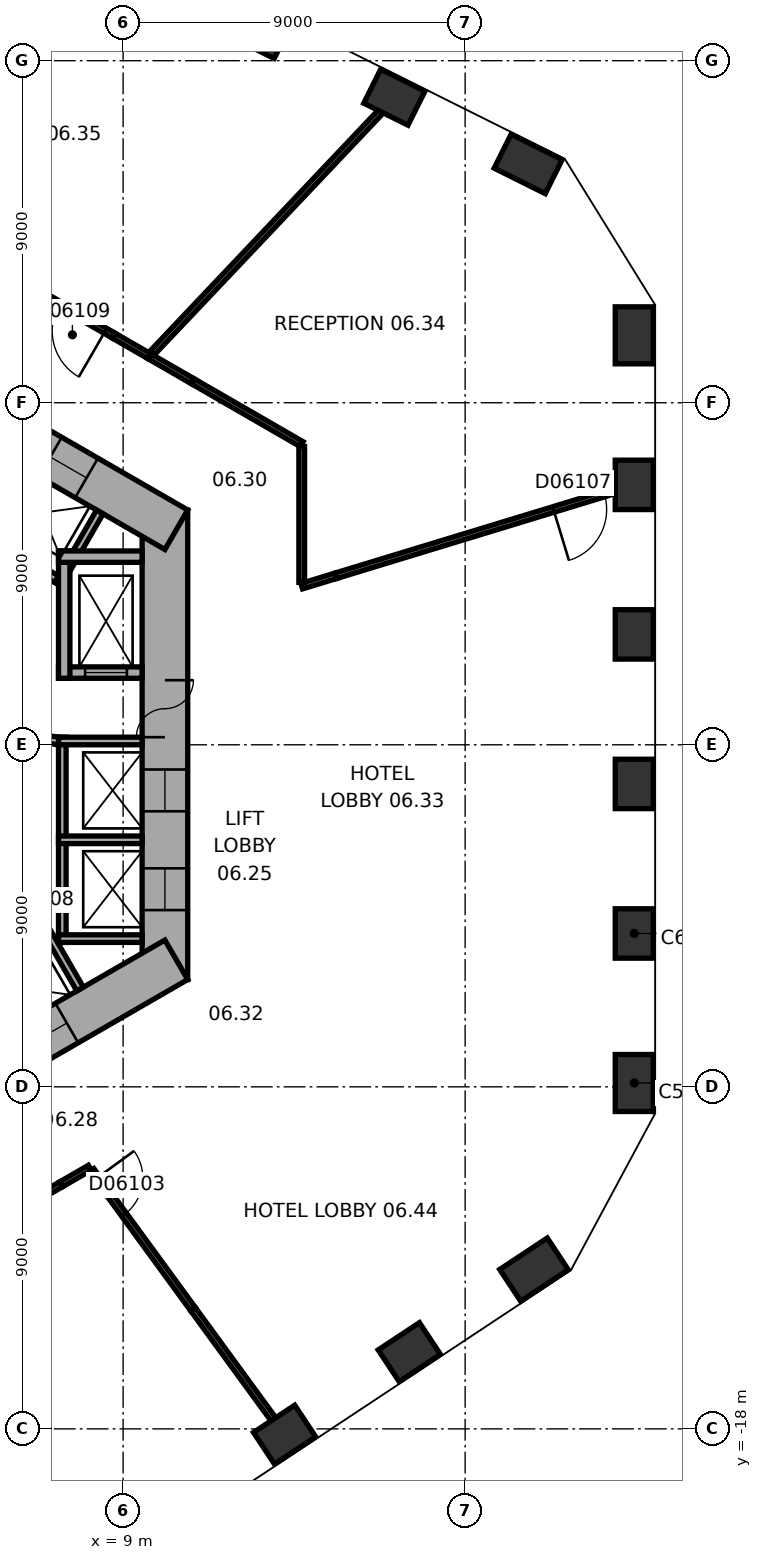
"""IFC4 building model, lengths in metres.
Left out: names, types, materials, properties, quantities, classifications, styles, units other than length and angle.
Written with IfcOpenShell. Run it as: python <this file> out.ifc"""

import sys

from ifc_helpers import new_model, si_unit, direction, frame, frame_2d, origin, origin_2d, place, context, subcontext, project, spatial, rectangle, extrude, element, fill, save


model = new_model("IFC4")
c1 = context("Model", 3, precision=1e-05, world=origin(), true_north=direction((0.0, 1.0)))
c2 = subcontext(c1, "Body", "Model", "MODEL_VIEW")
j1 = project(units=[si_unit("LENGTHUNIT", "METRE"), si_unit("PLANEANGLEUNIT", "RADIAN")], contexts=[c1])
p1 = place(None, origin())
s1 = spatial("IfcSite", under=j1, at=p1, CompositionType="ELEMENT")
p2 = place(p1, origin())
s2 = spatial("IfcBuilding", under=s1, at=p2, CompositionType="ELEMENT")
p3 = place(p2, frame((0.0, 0.0, 39.0)))
s3 = spatial("IfcBuildingStorey", under=s2, at=p3, CompositionType="ELEMENT", Elevation=39.0)
p4 = place(p3, frame((22.45, -8.899, 0.0), z_axis=(0.0, 0.0, 1.0), x_axis=(0.0, 1.0, 0.0)))
e1 = element("IfcColumn", 1, at=p4, inside=s3, PredefinedType="COLUMN", context=c2, shape_type="SweptSolid", body=[
    extrude(rectangle(XDim=1.5, YDim=1.0, at=origin_2d()), origin(), (0.0, 0.0, 1.0), 5.0),
])
for number, where, z_axis, x_axis in (
    (2, (22.45, -4.965, 0.0), (0.0, 0.0, 1.0), (0.0, 1.0, 0.0)),
    (3, (22.45, -1.03, 0.0), (0.0, 0.0, 1.0), (0.0, 1.0, 0.0)),
    (4, (22.45, 2.905, 0.0), (0.0, 0.0, 1.0), (0.0, 1.0, 0.0)),
    (5, (22.45, 6.839, 0.0), (0.0, 0.0, 1.0), (0.0, 1.0, 0.0)),
):
    element("IfcColumn", number, at=place(p3, frame(where, z_axis=z_axis, x_axis=x_axis)), inside=s3, PredefinedType="COLUMN", context=c2, shape_type="SweptSolid", body=[
        extrude(rectangle(XDim=1.3, YDim=1.0, at=origin_2d()), origin(), (0.0, 0.0, 1.0), 5.0),
    ])
for number, where, z_axis, x_axis in (
    (6, (22.45, 10.774, 0.0), (0.0, 0.0, 1.0), (0.0, 1.0, 0.0)),
    (7, (19.659, 15.284, 0.0), (0.0, 0.0, 1.0), (-0.895, 0.446, 0.0)),
):
    element("IfcColumn", number, at=place(p3, frame(where, z_axis=z_axis, x_axis=x_axis)), inside=s3, PredefinedType="COLUMN", context=c2, shape_type="SweptSolid", body=[
        extrude(rectangle(XDim=1.5, YDim=1.0, at=origin_2d()), origin(), (0.0, 0.0, 1.0), 5.0),
    ])
for number, where, z_axis, x_axis in (
    (8, (16.138, 17.04, 0.0), (0.0, 0.0, 1.0), (-0.895, 0.446, 0.0)),
    (9, (12.616, 18.795, 0.0), (0.0, 0.0, 1.0), (-0.895, 0.446, 0.0)),
    (10, (13.25, -18.152, 0.0), (0.0, 0.0, 1.0), (0.834, 0.552, 0.0)),
    (11, (16.531, -15.981, 0.0), (0.0, 0.0, 1.0), (0.834, 0.552, 0.0)),
):
    element("IfcColumn", number, at=place(p3, frame(where, z_axis=z_axis, x_axis=x_axis)), inside=s3, PredefinedType="COLUMN", context=c2, shape_type="SweptSolid", body=[
        extrude(rectangle(XDim=1.3, YDim=1.0, at=origin_2d()), origin(), (0.0, 0.0, 1.0), 5.0),
    ])
p5 = place(p3, frame((19.812, -13.809, 0.0), z_axis=(0.0, 0.0, 1.0), x_axis=(0.833885822067, 0.551936985312, 0.0)))
e12 = element("IfcColumn", 12, at=p5, inside=s3, PredefinedType="COLUMN", context=c2, shape_type="SweptSolid", body=[
    extrude(rectangle(XDim=1.5, YDim=1.0, at=origin_2d()), origin(), (0.0, 0.0, 1.0), 5.0),
])
p6 = place(p3, frame((10.1, -6.177, 0.0), z_axis=(0.0, 0.0, 1.0), x_axis=(0.0, 1.0, 0.0)))
e13 = element("IfcWall", 13, at=p6, inside=s3, PredefinedType="SHEAR", context=c2, shape_type="SweptSolid", body=[
    extrude(rectangle(XDim=12.355, YDim=1.2, at=frame_2d((6.177, 0.0))), origin(), (0.0, 0.0, 1.0), 5.0),
])
p7 = place(p6, frame((6.378, 0.0, 0.0)))
e14 = element("IfcOpeningElement", 14, at=p7, cuts=e13, PredefinedType="OPENING", context=c2, shape_type="SweptSolid", body=[
    extrude(rectangle(XDim=1.5, YDim=2.1, at=frame_2d((0.75, 1.05))), frame((0.0, 0.61, 0.0), z_axis=(0.0, -1.0, 0.0), x_axis=(1.0, 0.0, 0.0)), (0.0, 0.0, 1.0), 1.22),
])
p8 = place(p6, frame((1.828, 0.0, 0.0)))
e15 = element("IfcOpeningElement", 15, at=p8, cuts=e13, PredefinedType="OPENING", context=c2, shape_type="SweptSolid", body=[
    extrude(rectangle(XDim=1.1, YDim=2.1, at=frame_2d((0.55, 1.05))), frame((0.0, 0.61, 0.0), z_axis=(0.0, -1.0, 0.0), x_axis=(1.0, 0.0, 0.0)), (0.0, 0.0, 1.0), 1.22),
])
p9 = place(p6, frame((4.427, 0.0, 0.0)))
e16 = element("IfcOpeningElement", 16, at=p9, cuts=e13, PredefinedType="OPENING", context=c2, shape_type="SweptSolid", body=[
    extrude(rectangle(XDim=1.1, YDim=2.1, at=frame_2d((0.55, 1.05))), frame((0.0, 0.61, 0.0), z_axis=(0.0, -1.0, 0.0), x_axis=(1.0, 0.0, 0.0)), (0.0, 0.0, 1.0), 1.22),
])
p10 = place(p3, frame((10.4, 5.658, 0.0), z_axis=(0.0, 0.0, 1.0), x_axis=(-0.866021384402, 0.500006961711, 0.0)))
e17 = element("IfcWall", 17, at=p10, inside=s3, PredefinedType="SHEAR", context=c2, shape_type="SweptSolid", body=[
    extrude(rectangle(XDim=12.355, YDim=1.2, at=frame_2d((6.178, 0.0))), origin(), (0.0, 0.0, 1.0), 5.0),
])
p11 = place(p10, frame((2.728, 0.0, 0.0)))
e18 = element("IfcOpeningElement", 18, at=p11, cuts=e17, PredefinedType="OPENING", context=c2, shape_type="SweptSolid", body=[
    extrude(rectangle(XDim=1.1, YDim=2.1, at=frame_2d((0.55, 1.05))), frame((0.0, 0.61, 0.0), z_axis=(0.0, -1.0, 0.0), x_axis=(1.0, 0.0, 0.0)), (0.0, 0.0, 1.0), 1.22),
])
p12 = place(p10, frame((5.328, 0.0, 0.0)))
e19 = element("IfcOpeningElement", 19, at=p12, cuts=e17, PredefinedType="OPENING", context=c2, shape_type="SweptSolid", body=[
    extrude(rectangle(XDim=1.1, YDim=2.1, at=frame_2d((0.55, 1.05))), frame((0.0, 0.61, 0.0), z_axis=(0.0, -1.0, 0.0), x_axis=(1.0, 0.0, 0.0)), (0.0, 0.0, 1.0), 1.22),
])
p13 = place(p10, frame((7.928, 0.0, 0.0)))
e20 = element("IfcOpeningElement", 20, at=p13, cuts=e17, PredefinedType="OPENING", context=c2, shape_type="SweptSolid", body=[
    extrude(rectangle(XDim=1.1, YDim=2.1, at=frame_2d((0.55, 1.05))), frame((0.0, 0.61, 0.0), z_axis=(0.0, -1.0, 0.0), x_axis=(1.0, 0.0, 0.0)), (0.0, 0.0, 1.0), 1.22),
])
p14 = place(p3, frame((-0.3, -11.836, 0.0), z_axis=(0.0, 0.0, 1.0), x_axis=(0.866021384402, 0.500006961711, 0.0)))
e21 = element("IfcWall", 21, at=p14, inside=s3, PredefinedType="SHEAR", context=c2, shape_type="SweptSolid", body=[
    extrude(rectangle(XDim=12.355, YDim=1.2, at=frame_2d((6.178, 0.0))), origin(), (0.0, 0.0, 1.0), 5.0),
])
p15 = place(p14, frame((4.128, 0.0, 0.0)))
e22 = element("IfcOpeningElement", 22, at=p15, cuts=e21, PredefinedType="OPENING", context=c2, shape_type="SweptSolid", body=[
    extrude(rectangle(XDim=0.9, YDim=2.1, at=frame_2d((0.45, 1.05))), frame((0.0, 0.61, 0.0), z_axis=(0.0, -1.0, 0.0), x_axis=(1.0, 0.0, 0.0)), (0.0, 0.0, 1.0), 1.22),
])
p16 = place(p14, frame((7.928, 0.0, 0.0)))
e23 = element("IfcOpeningElement", 23, at=p16, cuts=e21, PredefinedType="OPENING", context=c2, shape_type="SweptSolid", body=[
    extrude(rectangle(XDim=1.1, YDim=2.1, at=frame_2d((0.55, 1.05))), frame((0.0, 0.61, 0.0), z_axis=(0.0, -1.0, 0.0), x_axis=(1.0, 0.0, 0.0)), (0.0, 0.0, 1.0), 1.22),
])
p17 = place(p3, frame((7.4, -5.2, 0.0), z_axis=(0.0, 0.0, 1.0), x_axis=(0.0, 1.0, 0.0)))
e24 = element("IfcWall", 24, at=p17, inside=s3, PredefinedType="PARTITIONING", context=c2, shape_type="SweptSolid", body=[
    extrude(rectangle(XDim=5.4, YDim=0.2, at=frame_2d((2.7, 0.0))), origin(), (0.0, 0.0, 1.0), 4.75),
])
for number, where, z_axis, x_axis in (
    (25, (7.3, -5.1, 0.0), (0.0, 0.0, 1.0), (1.0, 0.0, 0.0)),
    (26, (7.3, -2.5, 0.0), (0.0, 0.0, 1.0), (1.0, 0.0, 0.0)),
    (27, (7.3, 0.1, 0.0), (0.0, 0.0, 1.0), (1.0, 0.0, 0.0)),
):
    element("IfcWall", number, at=place(p3, frame(where, z_axis=z_axis, x_axis=x_axis)), inside=s3, PredefinedType="PARTITIONING", context=c2, shape_type="SweptSolid", body=[
        extrude(rectangle(XDim=2.2, YDim=0.2, at=frame_2d((1.1, 0.0))), origin(), (0.0, 0.0, 1.0), 4.75),
    ])
p18 = place(p3, frame((7.424, 4.259, 0.0), z_axis=(0.0, 0.0, 1.0), x_axis=(-0.866026010844, 0.49999894854, 0.0)))
e28 = element("IfcWall", 28, at=p18, inside=s3, PredefinedType="PARTITIONING", context=c2, shape_type="SweptSolid", body=[
    extrude(rectangle(XDim=8.0, YDim=0.2, at=frame_2d((4.0, 0.0))), origin(), (0.0, 0.0, 1.0), 4.75),
])
for number, where, z_axis, x_axis in (
    (29, (7.287, 4.222, 0.0), (0.0, 0.0, 1.0), (0.5, 0.866, 0.0)),
    (30, (6.768, -4.522, 0.0), (0.0, 0.0, 1.0), (0.5, -0.866, 0.0)),
):
    element("IfcWall", number, at=place(p3, frame(where, z_axis=z_axis, x_axis=x_axis)), inside=s3, PredefinedType="PARTITIONING", context=c2, shape_type="SweptSolid", body=[
        extrude(rectangle(XDim=2.2, YDim=0.2, at=frame_2d((1.1, 0.0))), origin(), (0.0, 0.0, 1.0), 4.75),
    ])
p19 = place(p3, frame((4.816, -0.222, 0.0), z_axis=(0.0, 0.0, 1.0), x_axis=(0.499977259774, -0.866038532462, 0.0)))
e31 = element("IfcWall", 31, at=p19, inside=s3, PredefinedType="SHEAR", context=c2, shape_type="SweptSolid", body=[
    extrude(rectangle(XDim=4.7, YDim=0.3, at=frame_2d((2.35, 0.0))), origin(), (0.0, 0.0, 1.0), 4.75),
])
p20 = place(p3, frame((7.3, 1.9, 0.0), z_axis=(0.0, 0.0, 1.0), x_axis=(1.0, 0.0, 0.0)))
e32 = element("IfcWall", 32, at=p20, inside=s3, PredefinedType="SHEAR", context=c2, shape_type="SweptSolid", body=[
    extrude(rectangle(XDim=2.2, YDim=0.3, at=frame_2d((1.1, 0.0))), origin(), (0.0, 0.0, 1.0), 4.75),
])
p21 = place(p20, frame((0.7, 0.0, 0.0)))
e33 = element("IfcOpeningElement", 33, at=p21, cuts=e32, PredefinedType="OPENING", context=c2, shape_type="SweptSolid", body=[
    extrude(rectangle(XDim=1.1, YDim=2.1, at=frame_2d((0.55, 1.05))), frame((0.0, 0.16, 0.0), z_axis=(0.0, -1.0, 0.0), x_axis=(1.0, 0.0, 0.0)), (0.0, 0.0, 1.0), 0.32),
])
p22 = place(p3, frame((7.45, 1.75, 0.0), z_axis=(0.0, 0.0, 1.0), x_axis=(0.0, 1.0, 0.0)))
e34 = element("IfcWall", 34, at=p22, inside=s3, PredefinedType="SHEAR", context=c2, shape_type="SweptSolid", body=[
    extrude(rectangle(XDim=3.35, YDim=0.3, at=frame_2d((1.675, 0.0))), origin(), (0.0, 0.0, 1.0), 4.75),
])
p23 = place(p3, frame((7.3, 4.95, 0.0), z_axis=(0.0, 0.0, 1.0), x_axis=(1.0, 0.0, 0.0)))
e35 = element("IfcWall", 35, at=p23, inside=s3, PredefinedType="SHEAR", context=c2, shape_type="SweptSolid", body=[
    extrude(rectangle(XDim=2.2, YDim=0.3, at=frame_2d((1.1, 0.0))), origin(), (0.0, 0.0, 1.0), 4.75),
])
p24 = place(p3, frame((4.327, 0.521, 0.0), z_axis=(0.0, 0.0, 1.0), x_axis=(0.990124376366, -0.14019172346, 0.0)))
e36 = element("IfcWall", 36, at=p24, inside=s3, PredefinedType="PARTITIONING", context=c2, shape_type="SweptSolid", body=[
    extrude(rectangle(XDim=3.002, YDim=0.2, at=frame_2d((1.501, 0.0))), origin(), (0.0, 0.0, 1.0), 4.75),
])
p25 = place(p24, frame((1.15, 0.0, 0.0)))
e37 = element("IfcOpeningElement", 37, at=p25, cuts=e36, PredefinedType="OPENING", context=c2, shape_type="SweptSolid", body=[
    extrude(rectangle(XDim=0.9, YDim=2.1, at=frame_2d((0.45, 1.05))), frame((0.0, 0.11, 0.0), z_axis=(0.0, -1.0, 0.0), x_axis=(1.0, 0.0, 0.0)), (0.0, 0.0, 1.0), 0.22),
])
p26 = place(p3, frame((10.835, -14.844, 0.0), z_axis=(0.0, 0.0, 1.0), x_axis=(0.589604414089, -0.807692165919, 0.0)))
e38 = element("IfcWall", 38, at=p26, inside=s3, PredefinedType="PARTITIONING", context=c2, shape_type="SweptSolid", body=[
    extrude(rectangle(XDim=3.594, YDim=0.15, at=frame_2d((1.797, 0.0))), origin(), (0.0, 0.0, 1.0), 4.75),
])
p27 = place(p3, frame((7.369, -11.564, 0.0), z_axis=(0.0, 0.0, 1.0), x_axis=(-0.86600466253, -0.500035923186, 0.0)))
e39 = element("IfcWall", 39, at=p27, inside=s3, PredefinedType="PARTITIONING", context=c2, shape_type="SweptSolid", body=[
    extrude(rectangle(XDim=8.45, YDim=0.15, at=frame_2d((4.225, 0.0))), origin(), (0.0, 0.0, 1.0), 4.75),
])
p28 = place(p3, frame((7.369, -11.564, 0.0), z_axis=(0.0, 0.0, 1.0), x_axis=(0.865956808668, 0.50011879141, 0.0)))
e40 = element("IfcWall", 40, at=p28, inside=s3, PredefinedType="PARTITIONING", context=c2, shape_type="SweptSolid", body=[
    extrude(rectangle(XDim=0.871, YDim=0.15, at=frame_2d((0.436, 0.0))), origin(), (0.0, 0.0, 1.0), 4.75),
])
p29 = place(p3, frame((8.171, -11.194, 0.0), z_axis=(0.0, 0.0, 1.0), x_axis=(0.589561466491, -0.807723515337, 0.0)))
e41 = element("IfcWall", 41, at=p29, inside=s3, PredefinedType="PARTITIONING", context=c2, shape_type="SweptSolid", body=[
    extrude(rectangle(XDim=4.52, YDim=0.15, at=frame_2d((2.26, 0.0))), origin(), (0.0, 0.0, 1.0), 4.75),
])
p30 = place(p29, frame((0.25, 0.0, 0.0)))
e42 = element("IfcOpeningElement", 42, at=p30, cuts=e41, PredefinedType="OPENING", context=c2, shape_type="SweptSolid", body=[
    extrude(rectangle(XDim=1.2, YDim=2.1, at=frame_2d((0.6, 1.05))), frame((0.0, 0.085, 0.0), z_axis=(0.0, -1.0, 0.0), x_axis=(1.0, 0.0, 0.0)), (0.0, 0.0, 1.0), 0.17),
])
p31 = place(p3, frame((14.593, 4.446, 0.0), z_axis=(0.0, 0.0, 1.0), x_axis=(-0.956578767646, -0.291473946159, 0.0)))
e43 = element("IfcWall", 43, at=p31, inside=s3, PredefinedType="PARTITIONING", context=c2, shape_type="SweptSolid", body=[
    extrude(rectangle(XDim=0.933, YDim=0.15, at=frame_2d((0.467, 0.0))), origin(), (0.0, 0.0, 1.0), 4.3),
])
p32 = place(p3, frame((14.593, 4.446, 0.0), z_axis=(0.0, 0.0, 1.0), x_axis=(0.956592729621, 0.291428120874, 0.0)))
e44 = element("IfcWall", 44, at=p32, inside=s3, PredefinedType="PARTITIONING", context=c2, shape_type="SweptSolid", body=[
    extrude(rectangle(XDim=7.691, YDim=0.15, at=frame_2d((3.846, 0.0))), origin(), (0.0, 0.0, 1.0), 4.3),
])
p33 = place(p32, frame((5.991, 0.0, 0.0)))
e45 = element("IfcOpeningElement", 45, at=p33, cuts=e44, PredefinedType="OPENING", context=c2, shape_type="SweptSolid", body=[
    extrude(rectangle(XDim=1.4, YDim=2.4, at=frame_2d((0.7, 1.2))), frame((0.0, 0.085, 0.0), z_axis=(0.0, -1.0, 0.0), x_axis=(1.0, 0.0, 0.0)), (0.0, 0.0, 1.0), 0.17),
])
p34 = place(p3, frame((13.7, 7.85, 0.0), z_axis=(0.0, 0.0, 1.0), x_axis=(0.0, -1.0, 0.0)))
e46 = element("IfcWall", 46, at=p34, inside=s3, PredefinedType="PARTITIONING", context=c2, shape_type="SweptSolid", body=[
    extrude(rectangle(XDim=3.576, YDim=0.15, at=frame_2d((1.788, 0.0))), origin(), (0.0, 0.0, 1.0), 4.75),
])
p35 = place(p3, frame((13.7, 7.909, 0.0), z_axis=(0.0, 0.0, 1.0), x_axis=(-0.866014848099, 0.500018282537, 0.0)))
e47 = element("IfcWall", 47, at=p35, inside=s3, PredefinedType="PARTITIONING", context=c2, shape_type="SweptSolid", body=[
    extrude(rectangle(XDim=3.31, YDim=0.15, at=frame_2d((1.655, 0.0))), origin(), (0.0, 0.0, 1.0), 4.75),
])
p36 = place(p3, frame((10.833, 9.564, 0.0), z_axis=(0.0, 0.0, 1.0), x_axis=(-0.865989200783, 0.500062700197, 0.0)))
e48 = element("IfcWall", 48, at=p36, inside=s3, PredefinedType="PARTITIONING", context=c2, shape_type="SweptSolid", body=[
    extrude(rectangle(XDim=1.325, YDim=0.15, at=frame_2d((0.663, 0.0))), origin(), (0.0, 0.0, 1.0), 4.75),
])
p37 = place(p3, frame((9.686, 10.227, 0.0), z_axis=(0.0, 0.0, 1.0), x_axis=(-0.866065156741, 0.499931139538, 0.0)))
e49 = element("IfcWall", 49, at=p37, inside=s3, PredefinedType="PARTITIONING", context=c2, shape_type="SweptSolid", body=[
    extrude(rectangle(XDim=1.08, YDim=0.15, at=frame_2d((0.54, 0.0))), origin(), (0.0, 0.0, 1.0), 4.75),
])
p38 = place(p3, frame((9.755, 10.3, 0.0), z_axis=(0.0, 0.0, 1.0), x_axis=(0.687615543878, 0.72607497121, 0.0)))
e50 = element("IfcWall", 50, at=p38, inside=s3, PredefinedType="PARTITIONING", context=c2, shape_type="SweptSolid", body=[
    extrude(rectangle(XDim=8.76, YDim=0.15, at=frame_2d((4.38, 0.0))), origin(), (0.0, 0.0, 1.0), 4.75),
])
p39 = place(p3, frame((8.75, 10.767, 0.0), z_axis=(0.0, 0.0, 1.0), x_axis=(-0.866010341957, 0.500026086943, 0.0)))
e51 = element("IfcWall", 51, at=p39, inside=s3, PredefinedType="PARTITIONING", context=c2, shape_type="SweptSolid", body=[
    extrude(rectangle(XDim=6.195, YDim=0.15, at=frame_2d((3.097, 0.0))), origin(), (0.0, 0.0, 1.0), 4.75),
])
p40 = place(p39, frame((0.25, 0.0, 0.0)))
e52 = element("IfcOpeningElement", 52, at=p40, cuts=e51, PredefinedType="OPENING", context=c2, shape_type="SweptSolid", body=[
    extrude(rectangle(XDim=1.4, YDim=2.4, at=frame_2d((0.7, 1.2))), frame((0.0, 0.085, 0.0), z_axis=(0.0, -1.0, 0.0), x_axis=(1.0, 0.0, 0.0)), (0.0, 0.0, 1.0), 0.17),
])
p41 = place(p7, origin())
e53 = element("IfcDoor", 53, at=p41, inside=s3, OperationType="DOUBLE_DOOR_SINGLE_SWING", PredefinedType="DOOR", context=c2, shape_type="SweptSolid", body=[
    extrude(rectangle(XDim=1.5, YDim=2.1, at=frame_2d((0.75, 1.05))), frame((0.0, 0.025, 0.0), z_axis=(0.0, -1.0, 0.0), x_axis=(1.0, 0.0, 0.0)), (0.0, 0.0, 1.0), 0.05),
])
fill(e14, e53)
p42 = place(p21, origin())
e54 = element("IfcDoor", 54, at=p42, inside=s3, OperationType="DOUBLE_DOOR_SLIDING", PredefinedType="DOOR", context=c2, shape_type="SweptSolid", body=[
    extrude(rectangle(XDim=1.1, YDim=2.1, at=frame_2d((0.55, 1.05))), frame((0.0, 0.025, 0.0), z_axis=(0.0, -1.0, 0.0), x_axis=(1.0, 0.0, 0.0)), (0.0, 0.0, 1.0), 0.05),
])
fill(e33, e54)
p43 = place(p8, origin())
e55 = element("IfcDoor", 55, at=p43, inside=s3, OperationType="DOUBLE_DOOR_SLIDING", PredefinedType="DOOR", context=c2, shape_type="SweptSolid", body=[
    extrude(rectangle(XDim=1.1, YDim=2.1, at=frame_2d((0.55, 1.05))), frame((0.0, 0.025, 0.0), z_axis=(0.0, -1.0, 0.0), x_axis=(1.0, 0.0, 0.0)), (0.0, 0.0, 1.0), 0.05),
])
fill(e15, e55)
p44 = place(p9, origin())
e56 = element("IfcDoor", 56, at=p44, inside=s3, OperationType="DOUBLE_DOOR_SLIDING", PredefinedType="DOOR", context=c2, shape_type="SweptSolid", body=[
    extrude(rectangle(XDim=1.1, YDim=2.1, at=frame_2d((0.55, 1.05))), frame((0.0, 0.025, 0.0), z_axis=(0.0, -1.0, 0.0), x_axis=(1.0, 0.0, 0.0)), (0.0, 0.0, 1.0), 0.05),
])
fill(e16, e56)
p45 = place(p11, origin())
e57 = element("IfcDoor", 57, at=p45, inside=s3, OperationType="DOUBLE_DOOR_SLIDING", PredefinedType="DOOR", context=c2, shape_type="SweptSolid", body=[
    extrude(rectangle(XDim=1.1, YDim=2.1, at=frame_2d((0.55, 1.05))), frame((0.0, 0.025, 0.0), z_axis=(0.0, -1.0, 0.0), x_axis=(1.0, 0.0, 0.0)), (0.0, 0.0, 1.0), 0.05),
])
fill(e18, e57)
p46 = place(p16, origin())
e58 = element("IfcDoor", 58, at=p46, inside=s3, OperationType="DOUBLE_DOOR_SLIDING", PredefinedType="DOOR", context=c2, shape_type="SweptSolid", body=[
    extrude(rectangle(XDim=1.1, YDim=2.1, at=frame_2d((0.55, 1.05))), frame((0.0, 0.025, 0.0), z_axis=(0.0, -1.0, 0.0), x_axis=(1.0, 0.0, 0.0)), (0.0, 0.0, 1.0), 0.05),
])
fill(e23, e58)
p47 = place(p30, origin())
e59 = element("IfcDoor", 59, at=p47, inside=s3, OperationType="SINGLE_SWING_LEFT", PredefinedType="DOOR", context=c2, shape_type="SweptSolid", body=[
    extrude(rectangle(XDim=1.2, YDim=2.1, at=frame_2d((0.6, 1.05))), frame((0.0, 0.025, 0.0), z_axis=(0.0, -1.0, 0.0), x_axis=(1.0, 0.0, 0.0)), (0.0, 0.0, 1.0), 0.05),
])
fill(e42, e59)
p48 = place(p33, origin())
e60 = element("IfcDoor", 60, at=p48, inside=s3, OperationType="SINGLE_SWING_LEFT", PredefinedType="DOOR", context=c2, shape_type="SweptSolid", body=[
    extrude(rectangle(XDim=1.4, YDim=2.4, at=frame_2d((0.7, 1.2))), frame((0.0, 0.025, 0.0), z_axis=(0.0, -1.0, 0.0), x_axis=(1.0, 0.0, 0.0)), (0.0, 0.0, 1.0), 0.05),
])
fill(e45, e60)
p49 = place(p40, origin())
e61 = element("IfcDoor", 61, at=p49, inside=s3, OperationType="SINGLE_SWING_LEFT", PredefinedType="DOOR", context=c2, shape_type="SweptSolid", body=[
    extrude(rectangle(XDim=1.4, YDim=2.4, at=frame_2d((0.7, 1.2))), frame((0.0, 0.025, 0.0), z_axis=(0.0, -1.0, 0.0), x_axis=(1.0, 0.0, 0.0)), (0.0, 0.0, 1.0), 0.05),
])
fill(e52, e61)
save(model, sys.argv[1])
